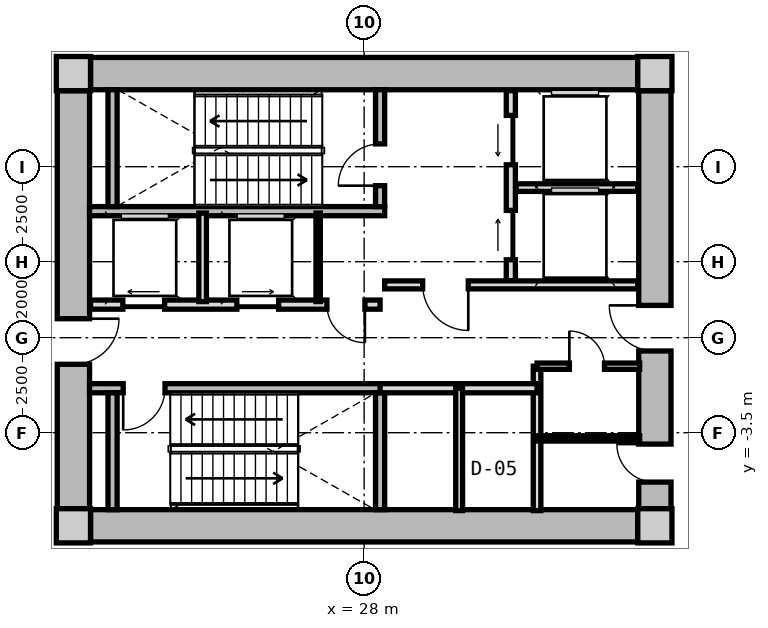
"""IFC4 building model, lengths in metres.
Left out: names, types, materials, properties, quantities, classifications, styles, units other than length and angle.
Written with IfcOpenShell. Run it as: python <this file> out.ifc"""

import sys

from ifc_helpers import new_model, si_unit, direction, frame, frame_2d, origin, origin_2d, place, context, subcontext, project, spatial, rectangle, extrude, source, transform, mapped, element, fill, save


model = new_model("IFC4")
c1 = context("Model", 3, precision=1e-05, world=origin(), true_north=direction((0.0, 1.0)))
c2 = subcontext(c1, "Body", "Model", "MODEL_VIEW")
j1 = project(units=[si_unit("LENGTHUNIT", "METRE"), si_unit("PLANEANGLEUNIT", "RADIAN")], contexts=[c1])
p1 = place(None, origin())
s1 = spatial("IfcSite", under=j1, at=p1, CompositionType="ELEMENT")
p2 = place(p1, origin())
s2 = spatial("IfcBuilding", under=s1, at=p2, CompositionType="ELEMENT")
p3 = place(p2, frame((0.0, 0.0, 73.45)))
s3 = spatial("IfcBuildingStorey", under=s2, at=p3, CompositionType="ELEMENT", Elevation=73.45)
m1 = source(origin(), c2, "Body", "SweptSolid", [
    extrude(rectangle(XDim=0.9, YDim=0.9, at=origin_2d()), origin(), (0.0, 0.0, 1.0), 4.5),
])
for number, where, z_axis, x_axis in (
    (1, (20.35, -5.95, 0.0), (0.0, 0.0, 1.0), (1.0, 0.0, 0.0)),
    (2, (35.65, -5.95, 0.0), (0.0, 0.0, 1.0), (1.0, 0.0, 0.0)),
    (3, (35.65, 5.95, 0.0), (0.0, 0.0, 1.0), (1.0, 0.0, 0.0)),
    (4, (20.35, 5.95, 0.0), (0.0, 0.0, 1.0), (1.0, 0.0, 0.0)),
):
    element("IfcColumn", number, at=place(p3, frame(where, z_axis=z_axis, x_axis=x_axis)), inside=s3, PredefinedType="COLUMN", context=c2, shape_type="MappedRepresentation", body=[
        mapped(m1, transform((0.0, 0.0, 0.0), x_axis=(1.0, 0.0, 0.0), y_axis=(0.0, 1.0, 0.0), z_axis=(0.0, 0.0, 1.0), scale=1.0)),
    ])
m2 = source(origin(), c2, "Body", "SweptSolid", [
    extrude(rectangle(XDim=14.4, YDim=0.85, at=frame_2d((7.2, 0.0))), origin(), (0.0, 0.0, 1.0), 4.08),
])
for number, where, z_axis, x_axis in (
    (5, (20.8, 5.95, 0.0), (0.0, 0.0, 1.0), (1.0, 0.0, 0.0)),
    (6, (35.2, -5.95, 0.0), (0.0, 0.0, 1.0), (-1.0, 0.0, 0.0)),
):
    element("IfcWall", number, at=place(p3, frame(where, z_axis=z_axis, x_axis=x_axis)), inside=s3, PredefinedType="SHEAR", context=c2, shape_type="MappedRepresentation", body=[
        mapped(m2, transform((0.0, 0.0, 0.0), x_axis=(1.0, 0.0, 0.0), y_axis=(0.0, 1.0, 0.0), z_axis=(0.0, 0.0, 1.0), scale=1.0)),
    ])
m3 = source(origin(), c2, "Body", "SweptSolid", [
    extrude(rectangle(XDim=11.0, YDim=0.85, at=frame_2d((5.5, 0.0))), origin(), (0.0, 0.0, 1.0), 4.08),
])
p4 = place(p3, frame((20.35, -5.5, 0.0), z_axis=(0.0, 0.0, 1.0), x_axis=(0.0, 1.0, 0.0)))
e7 = element("IfcWall", 7, at=p4, inside=s3, PredefinedType="SHEAR", context=c2, shape_type="MappedRepresentation", body=[
    mapped(m3, transform((0.0, 0.0, 0.0), x_axis=(1.0, 0.0, 0.0), y_axis=(0.0, 1.0, 0.0), z_axis=(0.0, 0.0, 1.0), scale=1.0)),
])
p5 = place(p4, frame((3.8, 0.0, 0.0)))
e8 = element("IfcOpeningElement", 8, at=p5, cuts=e7, PredefinedType="OPENING", context=c2, shape_type="SweptSolid", body=[
    extrude(rectangle(XDim=1.2, YDim=2.15, at=frame_2d((0.6, 1.075))), frame((0.0, 0.435, 0.0), z_axis=(0.0, -1.0, 0.0), x_axis=(1.0, 0.0, 0.0)), (0.0, 0.0, 1.0), 0.87),
])
p6 = place(p3, frame((35.65, 5.5, 0.0), z_axis=(0.0, 0.0, 1.0), x_axis=(0.0, -1.0, 0.0)))
e9 = element("IfcWall", 9, at=p6, inside=s3, PredefinedType="SHEAR", context=c2, shape_type="MappedRepresentation", body=[
    mapped(m3, transform((0.0, 0.0, 0.0), x_axis=(1.0, 0.0, 0.0), y_axis=(0.0, 1.0, 0.0), z_axis=(0.0, 0.0, 1.0), scale=1.0)),
])
p7 = place(p6, frame((5.65, 0.0, 0.0)))
e10 = element("IfcOpeningElement", 10, at=p7, cuts=e9, PredefinedType="OPENING", context=c2, shape_type="SweptSolid", body=[
    extrude(rectangle(XDim=1.2, YDim=2.15, at=frame_2d((0.6, 1.075))), frame((0.0, 0.435, 0.0), z_axis=(0.0, -1.0, 0.0), x_axis=(1.0, 0.0, 0.0)), (0.0, 0.0, 1.0), 0.87),
])
p8 = place(p6, frame((9.3, 0.0, 0.0)))
e11 = element("IfcOpeningElement", 11, at=p8, cuts=e9, PredefinedType="OPENING", context=c2, shape_type="SweptSolid", body=[
    extrude(rectangle(XDim=1.0, YDim=2.1, at=frame_2d((0.5, 1.05))), frame((0.0, 0.435, 0.0), z_axis=(0.0, -1.0, 0.0), x_axis=(1.0, 0.0, 0.0)), (0.0, 0.0, 1.0), 0.87),
])
m4 = source(origin(), c2, "Body", "SweptSolid", [
    extrude(rectangle(XDim=7.765, YDim=0.24, at=frame_2d((3.883, 0.0))), origin(), (0.0, 0.0, 1.0), 4.08),
])
p9 = place(p3, frame((20.775, 2.33, 0.0), z_axis=(0.0, 0.0, 1.0), x_axis=(1.0, 0.0, 0.0)))
e12 = element("IfcWall", 12, at=p9, inside=s3, PredefinedType="PARTITIONING", context=c2, shape_type="MappedRepresentation", body=[
    mapped(m4, transform((0.0, 0.0, 0.0), x_axis=(1.0, 0.0, 0.0), y_axis=(0.0, 1.0, 0.0), z_axis=(0.0, 0.0, 1.0), scale=1.0)),
])
m5 = source(origin(), c2, "Body", "SweptSolid", [
    extrude(rectangle(XDim=3.075, YDim=0.24, at=frame_2d((1.538, 0.0))), origin(), (0.0, 0.0, 1.0), 4.08),
])
p10 = place(p3, frame((21.38, 2.45, 0.0), z_axis=(0.0, 0.0, 1.0), x_axis=(0.0, 1.0, 0.0)))
e13 = element("IfcWall", 13, at=p10, inside=s3, PredefinedType="PARTITIONING", context=c2, shape_type="MappedRepresentation", body=[
    mapped(m5, transform((0.0, 0.0, 0.0), x_axis=(1.0, 0.0, 0.0), y_axis=(0.0, 1.0, 0.0), z_axis=(0.0, 0.0, 1.0), scale=1.0)),
])
p11 = place(p3, frame((28.42, 2.45, 0.0), z_axis=(0.0, 0.0, 1.0), x_axis=(0.0, 1.0, 0.0)))
e14 = element("IfcWall", 14, at=p11, inside=s3, PredefinedType="PARTITIONING", context=c2, shape_type="MappedRepresentation", body=[
    mapped(m5, transform((0.0, 0.0, 0.0), x_axis=(1.0, 0.0, 0.0), y_axis=(0.0, 1.0, 0.0), z_axis=(0.0, 0.0, 1.0), scale=1.0)),
])
p12 = place(p11, frame((0.55, 0.0, 0.0)))
e15 = element("IfcOpeningElement", 15, at=p12, cuts=e14, PredefinedType="OPENING", context=c2, shape_type="SweptSolid", body=[
    extrude(rectangle(XDim=1.1, YDim=2.15, at=frame_2d((0.55, 1.075))), frame((0.0, 0.13, 0.0), z_axis=(0.0, -1.0, 0.0), x_axis=(1.0, 0.0, 0.0)), (0.0, 0.0, 1.0), 0.26),
])
p13 = place(p3, frame((20.775, -2.33, 0.0), z_axis=(0.0, 0.0, 1.0), x_axis=(1.0, 0.0, 0.0)))
e16 = element("IfcWall", 16, at=p13, inside=s3, PredefinedType="PARTITIONING", context=c2, shape_type="MappedRepresentation", body=[
    mapped(m4, transform((0.0, 0.0, 0.0), x_axis=(1.0, 0.0, 0.0), y_axis=(0.0, 1.0, 0.0), z_axis=(0.0, 0.0, 1.0), scale=1.0)),
])
p14 = place(p13, frame((0.885, 0.0, 0.0)))
e17 = element("IfcOpeningElement", 17, at=p14, cuts=e16, PredefinedType="OPENING", context=c2, shape_type="SweptSolid", body=[
    extrude(rectangle(XDim=1.1, YDim=2.15, at=frame_2d((0.55, 1.075))), frame((0.0, 0.13, 0.0), z_axis=(0.0, -1.0, 0.0), x_axis=(1.0, 0.0, 0.0)), (0.0, 0.0, 1.0), 0.26),
])
for number, where, z_axis, x_axis in (
    (18, (21.38, -5.525, 0.0), (0.0, 0.0, 1.0), (0.0, 1.0, 0.0)),
    (19, (28.42, -5.525, 0.0), (0.0, 0.0, 1.0), (0.0, 1.0, 0.0)),
):
    element("IfcWall", number, at=place(p3, frame(where, z_axis=z_axis, x_axis=x_axis)), inside=s3, PredefinedType="PARTITIONING", context=c2, shape_type="MappedRepresentation", body=[
        mapped(m5, transform((0.0, 0.0, 0.0), x_axis=(1.0, 0.0, 0.0), y_axis=(0.0, 1.0, 0.0), z_axis=(0.0, 0.0, 1.0), scale=1.0)),
    ])
m6 = source(origin(), c2, "Body", "SweptSolid", [
    extrude(rectangle(XDim=5.0, YDim=0.24, at=frame_2d((2.5, 0.0))), origin(), (0.0, 0.0, 1.0), 4.065),
])
p15 = place(p3, frame((31.86, 0.5, 0.0), z_axis=(0.0, 0.0, 1.0), x_axis=(0.0, 1.0, 0.0)))
e20 = element("IfcWall", 20, at=p15, inside=s3, PredefinedType="PARTITIONING", context=c2, shape_type="MappedRepresentation", body=[
    mapped(m6, transform((0.0, 0.0, 0.0), x_axis=(1.0, 0.0, 0.0), y_axis=(0.0, 1.0, 0.0), z_axis=(0.0, 0.0, 1.0), scale=1.0)),
])
p16 = place(p15, frame((3.05, 0.0, 0.0)))
e21 = element("IfcOpeningElement", 21, at=p16, cuts=e20, PredefinedType="OPENING", context=c2, shape_type="SweptSolid", body=[
    extrude(rectangle(XDim=1.3, YDim=2.2, at=frame_2d((0.65, 1.1))), frame((0.0, 0.13, 0.0), z_axis=(0.0, -1.0, 0.0), x_axis=(1.0, 0.0, 0.0)), (0.0, 0.0, 1.0), 0.26),
])
p17 = place(p15, frame((0.55, 0.0, 0.0)))
e22 = element("IfcOpeningElement", 22, at=p17, cuts=e20, PredefinedType="OPENING", context=c2, shape_type="SweptSolid", body=[
    extrude(rectangle(XDim=1.3, YDim=2.2, at=frame_2d((0.65, 1.1))), frame((0.0, 0.13, 0.0), z_axis=(0.0, -1.0, 0.0), x_axis=(1.0, 0.0, 0.0)), (0.0, 0.0, 1.0), 0.26),
])
m7 = source(origin(), c2, "Body", "SweptSolid", [
    extrude(rectangle(XDim=3.2, YDim=0.2, at=frame_2d((1.6, 0.0))), origin(), (0.0, 0.0, 1.0), 4.065),
])
p18 = place(p3, frame((32.0, 2.95, 0.0), z_axis=(0.0, 0.0, 1.0), x_axis=(1.0, 0.0, 0.0)))
e23 = element("IfcWall", 23, at=p18, inside=s3, PredefinedType="PARTITIONING", context=c2, shape_type="MappedRepresentation", body=[
    mapped(m7, transform((0.0, 0.0, 0.0), x_axis=(1.0, 0.0, 0.0), y_axis=(0.0, 1.0, 0.0), z_axis=(0.0, 0.0, 1.0), scale=1.0)),
])
m8 = source(origin(), c2, "Body", "SweptSolid", [
    extrude(rectangle(XDim=6.66, YDim=0.21, at=frame_2d((3.33, 0.0))), origin(), (0.0, 0.0, 1.0), 4.065),
])
p19 = place(p3, frame((28.54, 0.39, 0.0), z_axis=(0.0, 0.0, 1.0), x_axis=(1.0, 0.0, 0.0)))
e24 = element("IfcWall", 24, at=p19, inside=s3, PredefinedType="PARTITIONING", context=c2, shape_type="MappedRepresentation", body=[
    mapped(m8, transform((0.0, 0.0, 0.0), x_axis=(1.0, 0.0, 0.0), y_axis=(0.0, 1.0, 0.0), z_axis=(0.0, 0.0, 1.0), scale=1.0)),
])
p20 = place(p19, frame((1.0, 0.0, 0.0)))
e25 = element("IfcOpeningElement", 25, at=p20, cuts=e24, PredefinedType="OPENING", context=c2, shape_type="SweptSolid", body=[
    extrude(rectangle(XDim=1.2, YDim=2.15, at=frame_2d((0.6, 1.075))), frame((0.0, 0.115, 0.0), z_axis=(0.0, -1.0, 0.0), x_axis=(1.0, 0.0, 0.0)), (0.0, 0.0, 1.0), 0.23),
])
m9 = source(origin(), c2, "Body", "SweptSolid", [
    extrude(rectangle(XDim=7.62, YDim=0.24, at=frame_2d((3.81, 0.0))), origin(), (0.0, 0.0, 1.0), 4.065),
])
p21 = place(p3, frame((20.8, -0.13, 0.0), z_axis=(0.0, 0.0, 1.0), x_axis=(1.0, 0.0, 0.0)))
e26 = element("IfcWall", 26, at=p21, inside=s3, PredefinedType="PARTITIONING", context=c2, shape_type="MappedRepresentation", body=[
    mapped(m9, transform((0.0, 0.0, 0.0), x_axis=(1.0, 0.0, 0.0), y_axis=(0.0, 1.0, 0.0), z_axis=(0.0, 0.0, 1.0), scale=1.0)),
])
p22 = place(p21, frame((6.22, 0.0, 0.0)))
e27 = element("IfcOpeningElement", 27, at=p22, cuts=e26, PredefinedType="OPENING", context=c2, shape_type="SweptSolid", body=[
    extrude(rectangle(XDim=1.0, YDim=2.1, at=frame_2d((0.5, 1.05))), frame((0.0, 0.13, 0.0), z_axis=(0.0, -1.0, 0.0), x_axis=(1.0, 0.0, 0.0)), (0.0, 0.0, 1.0), 0.26),
])
p23 = place(p21, frame((0.85, 0.0, 0.0)))
e28 = element("IfcOpeningElement", 28, at=p23, cuts=e26, PredefinedType="OPENING", context=c2, shape_type="SweptSolid", body=[
    extrude(rectangle(XDim=1.1, YDim=2.2, at=frame_2d((0.55, 1.1))), frame((0.0, 0.13, 0.0), z_axis=(0.0, -1.0, 0.0), x_axis=(1.0, 0.0, 0.0)), (0.0, 0.0, 1.0), 0.26),
])
p24 = place(p21, frame((3.85, 0.0, 0.0)))
e29 = element("IfcOpeningElement", 29, at=p24, cuts=e26, PredefinedType="OPENING", context=c2, shape_type="SweptSolid", body=[
    extrude(rectangle(XDim=1.1, YDim=2.2, at=frame_2d((0.55, 1.1))), frame((0.0, 0.13, 0.0), z_axis=(0.0, -1.0, 0.0), x_axis=(1.0, 0.0, 0.0)), (0.0, 0.0, 1.0), 0.26),
])
m10 = source(origin(), c2, "Body", "SweptSolid", [
    extrude(rectangle(XDim=2.33, YDim=0.115, at=frame_2d((1.165, 0.0))), origin(), (0.0, 0.0, 1.0), 4.065),
])
p25 = place(p3, frame((26.79, -0.05, 0.0), z_axis=(0.0, 0.0, 1.0), x_axis=(0.0, 1.0, 0.0)))
e30 = element("IfcWall", 30, at=p25, inside=s3, PredefinedType="PARTITIONING", context=c2, shape_type="MappedRepresentation", body=[
    mapped(m10, transform((0.0, 0.0, 0.0), x_axis=(1.0, 0.0, 0.0), y_axis=(0.0, 1.0, 0.0), z_axis=(0.0, 0.0, 1.0), scale=1.0)),
])
m11 = source(origin(), c2, "Body", "SweptSolid", [
    extrude(rectangle(XDim=2.33, YDim=0.2, at=frame_2d((1.165, 0.0))), origin(), (0.0, 0.0, 1.0), 4.065),
])
p26 = place(p3, frame((23.75, -0.05, 0.0), z_axis=(0.0, 0.0, 1.0), x_axis=(0.0, 1.0, 0.0)))
e31 = element("IfcWall", 31, at=p26, inside=s3, PredefinedType="PARTITIONING", context=c2, shape_type="MappedRepresentation", body=[
    mapped(m11, transform((0.0, 0.0, 0.0), x_axis=(1.0, 0.0, 0.0), y_axis=(0.0, 1.0, 0.0), z_axis=(0.0, 0.0, 1.0), scale=1.0)),
])
m12 = source(origin(), c2, "Body", "SweptSolid", [
    extrude(rectangle(XDim=3.8, YDim=0.2, at=frame_2d((1.9, 0.0))), origin(), (0.0, 0.0, 1.0), 4.065),
])
p27 = place(p3, frame((32.55, -5.55, 0.0), z_axis=(0.0, 0.0, 1.0), x_axis=(0.0, 1.0, 0.0)))
e32 = element("IfcWall", 32, at=p27, inside=s3, PredefinedType="PARTITIONING", context=c2, shape_type="MappedRepresentation", body=[
    mapped(m12, transform((0.0, 0.0, 0.0), x_axis=(1.0, 0.0, 0.0), y_axis=(0.0, 1.0, 0.0), z_axis=(0.0, 0.0, 1.0), scale=1.0)),
])
m13 = source(origin(), c2, "Body", "SweptSolid", [
    extrude(rectangle(XDim=4.13, YDim=0.24, at=frame_2d((2.065, 0.0))), origin(), (0.0, 0.0, 1.0), 4.065),
])
p28 = place(p3, frame((28.42, -2.33, 0.0), z_axis=(0.0, 0.0, 1.0), x_axis=(1.0, 0.0, 0.0)))
e33 = element("IfcWall", 33, at=p28, inside=s3, PredefinedType="PARTITIONING", context=c2, shape_type="MappedRepresentation", body=[
    mapped(m13, transform((0.0, 0.0, 0.0), x_axis=(1.0, 0.0, 0.0), y_axis=(0.0, 1.0, 0.0), z_axis=(0.0, 0.0, 1.0), scale=1.0)),
])
m14 = source(origin(), c2, "Body", "SweptSolid", [
    extrude(rectangle(XDim=3.22, YDim=0.18, at=frame_2d((1.61, 0.0))), origin(), (0.0, 0.0, 1.0), 4.065),
])
p29 = place(p3, frame((30.5, -5.55, 0.0), z_axis=(0.0, 0.0, 1.0), x_axis=(0.0, 1.0, 0.0)))
e34 = element("IfcWall", 34, at=p29, inside=s3, PredefinedType="PARTITIONING", context=c2, shape_type="MappedRepresentation", body=[
    mapped(m14, transform((0.0, 0.0, 0.0), x_axis=(1.0, 0.0, 0.0), y_axis=(0.0, 1.0, 0.0), z_axis=(0.0, 0.0, 1.0), scale=1.0)),
])
m15 = source(origin(), c2, "Body", "SweptSolid", [
    extrude(rectangle(XDim=2.7, YDim=0.165, at=frame_2d((1.35, 0.0))), origin(), (0.0, 0.0, 1.0), 4.065),
])
p30 = place(p3, frame((32.55, -1.75, 0.0), z_axis=(0.0, 0.0, 1.0), x_axis=(1.0, 0.0, 0.0)))
e35 = element("IfcWall", 35, at=p30, inside=s3, PredefinedType="PARTITIONING", context=c2, shape_type="MappedRepresentation", body=[
    mapped(m15, transform((0.0, 0.0, 0.0), x_axis=(1.0, 0.0, 0.0), y_axis=(0.0, 1.0, 0.0), z_axis=(0.0, 0.0, 1.0), scale=1.0)),
])
p31 = place(p30, frame((0.85, 0.0, 0.0)))
e36 = element("IfcOpeningElement", 36, at=p31, cuts=e35, PredefinedType="OPENING", context=c2, shape_type="SweptSolid", body=[
    extrude(rectangle(XDim=0.925, YDim=2.1, at=frame_2d((0.462, 1.05))), frame((0.0, 0.093, 0.0), z_axis=(0.0, -1.0, 0.0), x_axis=(1.0, 0.0, 0.0)), (0.0, 0.0, 1.0), 0.185),
])
m16 = source(origin(), c2, "Body", "SweptSolid", [
    extrude(rectangle(XDim=2.7, YDim=0.14, at=frame_2d((1.35, 0.0))), origin(), (0.0, 0.0, 1.0), 4.065),
])
p32 = place(p3, frame((32.55, -3.65, 0.0), z_axis=(0.0, 0.0, 1.0), x_axis=(1.0, 0.0, 0.0)))
e37 = element("IfcWall", 37, at=p32, inside=s3, PredefinedType="PARTITIONING", context=c2, shape_type="MappedRepresentation", body=[
    mapped(m16, transform((0.0, 0.0, 0.0), x_axis=(1.0, 0.0, 0.0), y_axis=(0.0, 1.0, 0.0), z_axis=(0.0, 0.0, 1.0), scale=1.0)),
])
m17 = source(origin(), c2, "Body", "SweptSolid", [
    extrude(rectangle(XDim=1.1, YDim=2.15, at=frame_2d((0.55, 1.075))), frame((0.0, 0.025, 0.0), z_axis=(0.0, -1.0, 0.0), x_axis=(1.0, 0.0, 0.0)), (0.0, 0.0, 1.0), 0.05),
])
p33 = place(p12, origin())
e38 = element("IfcDoor", 38, at=p33, inside=s3, OperationType="SINGLE_SWING_LEFT", PredefinedType="DOOR", context=c2, shape_type="MappedRepresentation", body=[
    mapped(m17, transform((0.0, 0.0, 0.0), x_axis=(1.0, 0.0, 0.0), y_axis=(0.0, 1.0, 0.0), z_axis=(0.0, 0.0, 1.0), scale=1.0)),
])
fill(e15, e38)
p34 = place(p14, frame((1.1, 0.0, 0.0), z_axis=(0.0, 0.0, 1.0), x_axis=(-1.0, 0.0, 0.0)))
e39 = element("IfcDoor", 39, at=p34, inside=s3, OperationType="SINGLE_SWING_RIGHT", PredefinedType="DOOR", context=c2, shape_type="MappedRepresentation", body=[
    mapped(m17, transform((0.0, 0.0, 0.0), x_axis=(1.0, 0.0, 0.0), y_axis=(0.0, 1.0, 0.0), z_axis=(0.0, 0.0, 1.0), scale=1.0)),
])
fill(e17, e39)
m18 = source(origin(), c2, "Body", "SweptSolid", [
    extrude(rectangle(XDim=1.3, YDim=2.2, at=frame_2d((0.65, 1.1))), frame((0.0, 0.025, 0.0), z_axis=(0.0, -1.0, 0.0), x_axis=(1.0, 0.0, 0.0)), (0.0, 0.0, 1.0), 0.05),
])
p35 = place(p16, origin())
e40 = element("IfcDoor", 40, at=p35, inside=s3, OperationType="SLIDING_TO_LEFT", PredefinedType="DOOR", context=c2, shape_type="MappedRepresentation", body=[
    mapped(m18, transform((0.0, 0.0, 0.0), x_axis=(1.0, 0.0, 0.0), y_axis=(0.0, 1.0, 0.0), z_axis=(0.0, 0.0, 1.0), scale=1.0)),
])
fill(e21, e40)
p36 = place(p17, origin())
e41 = element("IfcDoor", 41, at=p36, inside=s3, OperationType="SLIDING_TO_RIGHT", PredefinedType="DOOR", context=c2, shape_type="MappedRepresentation", body=[
    mapped(m18, transform((0.0, 0.0, 0.0), x_axis=(1.0, 0.0, 0.0), y_axis=(0.0, 1.0, 0.0), z_axis=(0.0, 0.0, 1.0), scale=1.0)),
])
fill(e22, e41)
m19 = source(origin(), c2, "Body", "SweptSolid", [
    extrude(rectangle(XDim=1.2, YDim=2.15, at=frame_2d((0.6, 1.075))), frame((0.0, 0.025, 0.0), z_axis=(0.0, -1.0, 0.0), x_axis=(1.0, 0.0, 0.0)), (0.0, 0.0, 1.0), 0.05),
])
p37 = place(p20, frame((1.2, 0.0, 0.0), z_axis=(0.0, 0.0, 1.0), x_axis=(-1.0, 0.0, 0.0)))
e42 = element("IfcDoor", 42, at=p37, inside=s3, OperationType="SINGLE_SWING_LEFT", PredefinedType="DOOR", context=c2, shape_type="MappedRepresentation", body=[
    mapped(m19, transform((0.0, 0.0, 0.0), x_axis=(1.0, 0.0, 0.0), y_axis=(0.0, 1.0, 0.0), z_axis=(0.0, 0.0, 1.0), scale=1.0)),
])
fill(e25, e42)
p38 = place(p5, frame((1.2, 0.0, 0.0), z_axis=(0.0, 0.0, 1.0), x_axis=(-1.0, 0.0, 0.0)))
e43 = element("IfcDoor", 43, at=p38, inside=s3, OperationType="SINGLE_SWING_LEFT", PredefinedType="DOOR", context=c2, shape_type="MappedRepresentation", body=[
    mapped(m19, transform((0.0, 0.0, 0.0), x_axis=(1.0, 0.0, 0.0), y_axis=(0.0, 1.0, 0.0), z_axis=(0.0, 0.0, 1.0), scale=1.0)),
])
fill(e8, e43)
p39 = place(p7, frame((1.2, 0.0, 0.0), z_axis=(0.0, 0.0, 1.0), x_axis=(-1.0, 0.0, 0.0)))
e44 = element("IfcDoor", 44, at=p39, inside=s3, OperationType="SINGLE_SWING_RIGHT", PredefinedType="DOOR", context=c2, shape_type="MappedRepresentation", body=[
    mapped(m19, transform((0.0, 0.0, 0.0), x_axis=(1.0, 0.0, 0.0), y_axis=(0.0, 1.0, 0.0), z_axis=(0.0, 0.0, 1.0), scale=1.0)),
])
fill(e10, e44)
m20 = source(origin(), c2, "Body", "SweptSolid", [
    extrude(rectangle(XDim=1.0, YDim=2.1, at=frame_2d((0.5, 1.05))), frame((0.0, 0.025, 0.0), z_axis=(0.0, -1.0, 0.0), x_axis=(1.0, 0.0, 0.0)), (0.0, 0.0, 1.0), 0.05),
])
p40 = place(p22, frame((1.0, 0.0, 0.0), z_axis=(0.0, 0.0, 1.0), x_axis=(-1.0, 0.0, 0.0)))
e45 = element("IfcDoor", 45, at=p40, inside=s3, OperationType="SINGLE_SWING_LEFT", PredefinedType="DOOR", context=c2, shape_type="MappedRepresentation", body=[
    mapped(m20, transform((0.0, 0.0, 0.0), x_axis=(1.0, 0.0, 0.0), y_axis=(0.0, 1.0, 0.0), z_axis=(0.0, 0.0, 1.0), scale=1.0)),
])
fill(e27, e45)
m21 = source(origin(), c2, "Body", "SweptSolid", [
    extrude(rectangle(XDim=1.1, YDim=2.2, at=frame_2d((0.55, 1.1))), frame((0.0, 0.025, 0.0), z_axis=(0.0, -1.0, 0.0), x_axis=(1.0, 0.0, 0.0)), (0.0, 0.0, 1.0), 0.05),
])
p41 = place(p23, origin())
e46 = element("IfcDoor", 46, at=p41, inside=s3, OperationType="SLIDING_TO_LEFT", PredefinedType="DOOR", context=c2, shape_type="MappedRepresentation", body=[
    mapped(m21, transform((0.0, 0.0, 0.0), x_axis=(1.0, 0.0, 0.0), y_axis=(0.0, 1.0, 0.0), z_axis=(0.0, 0.0, 1.0), scale=1.0)),
])
fill(e28, e46)
p42 = place(p24, origin())
e47 = element("IfcDoor", 47, at=p42, inside=s3, OperationType="SLIDING_TO_RIGHT", PredefinedType="DOOR", context=c2, shape_type="MappedRepresentation", body=[
    mapped(m21, transform((0.0, 0.0, 0.0), x_axis=(1.0, 0.0, 0.0), y_axis=(0.0, 1.0, 0.0), z_axis=(0.0, 0.0, 1.0), scale=1.0)),
])
fill(e29, e47)
m22 = source(origin(), c2, "Body", "SweptSolid", [
    extrude(rectangle(XDim=0.925, YDim=2.1, at=frame_2d((0.462, 1.05))), frame((0.0, 0.025, 0.0), z_axis=(0.0, -1.0, 0.0), x_axis=(1.0, 0.0, 0.0)), (0.0, 0.0, 1.0), 0.05),
])
p43 = place(p31, origin())
e48 = element("IfcDoor", 48, at=p43, inside=s3, OperationType="SINGLE_SWING_LEFT", PredefinedType="DOOR", context=c2, shape_type="MappedRepresentation", body=[
    mapped(m22, transform((0.0, 0.0, 0.0), x_axis=(1.0, 0.0, 0.0), y_axis=(0.0, 1.0, 0.0), z_axis=(0.0, 0.0, 1.0), scale=1.0)),
])
fill(e36, e48)
p44 = place(p8, frame((1.0, 0.0, 0.0), z_axis=(0.0, 0.0, 1.0), x_axis=(-1.0, 0.0, 0.0)))
e49 = element("IfcDoor", 49, at=p44, inside=s3, OperationType="SINGLE_SWING_RIGHT", PredefinedType="DOOR", context=c2, shape_type="MappedRepresentation", body=[
    mapped(m20, transform((0.0, 0.0, 0.0), x_axis=(1.0, 0.0, 0.0), y_axis=(0.0, 1.0, 0.0), z_axis=(0.0, 0.0, 1.0), scale=1.0)),
])
fill(e11, e49)
save(model, sys.argv[1])
